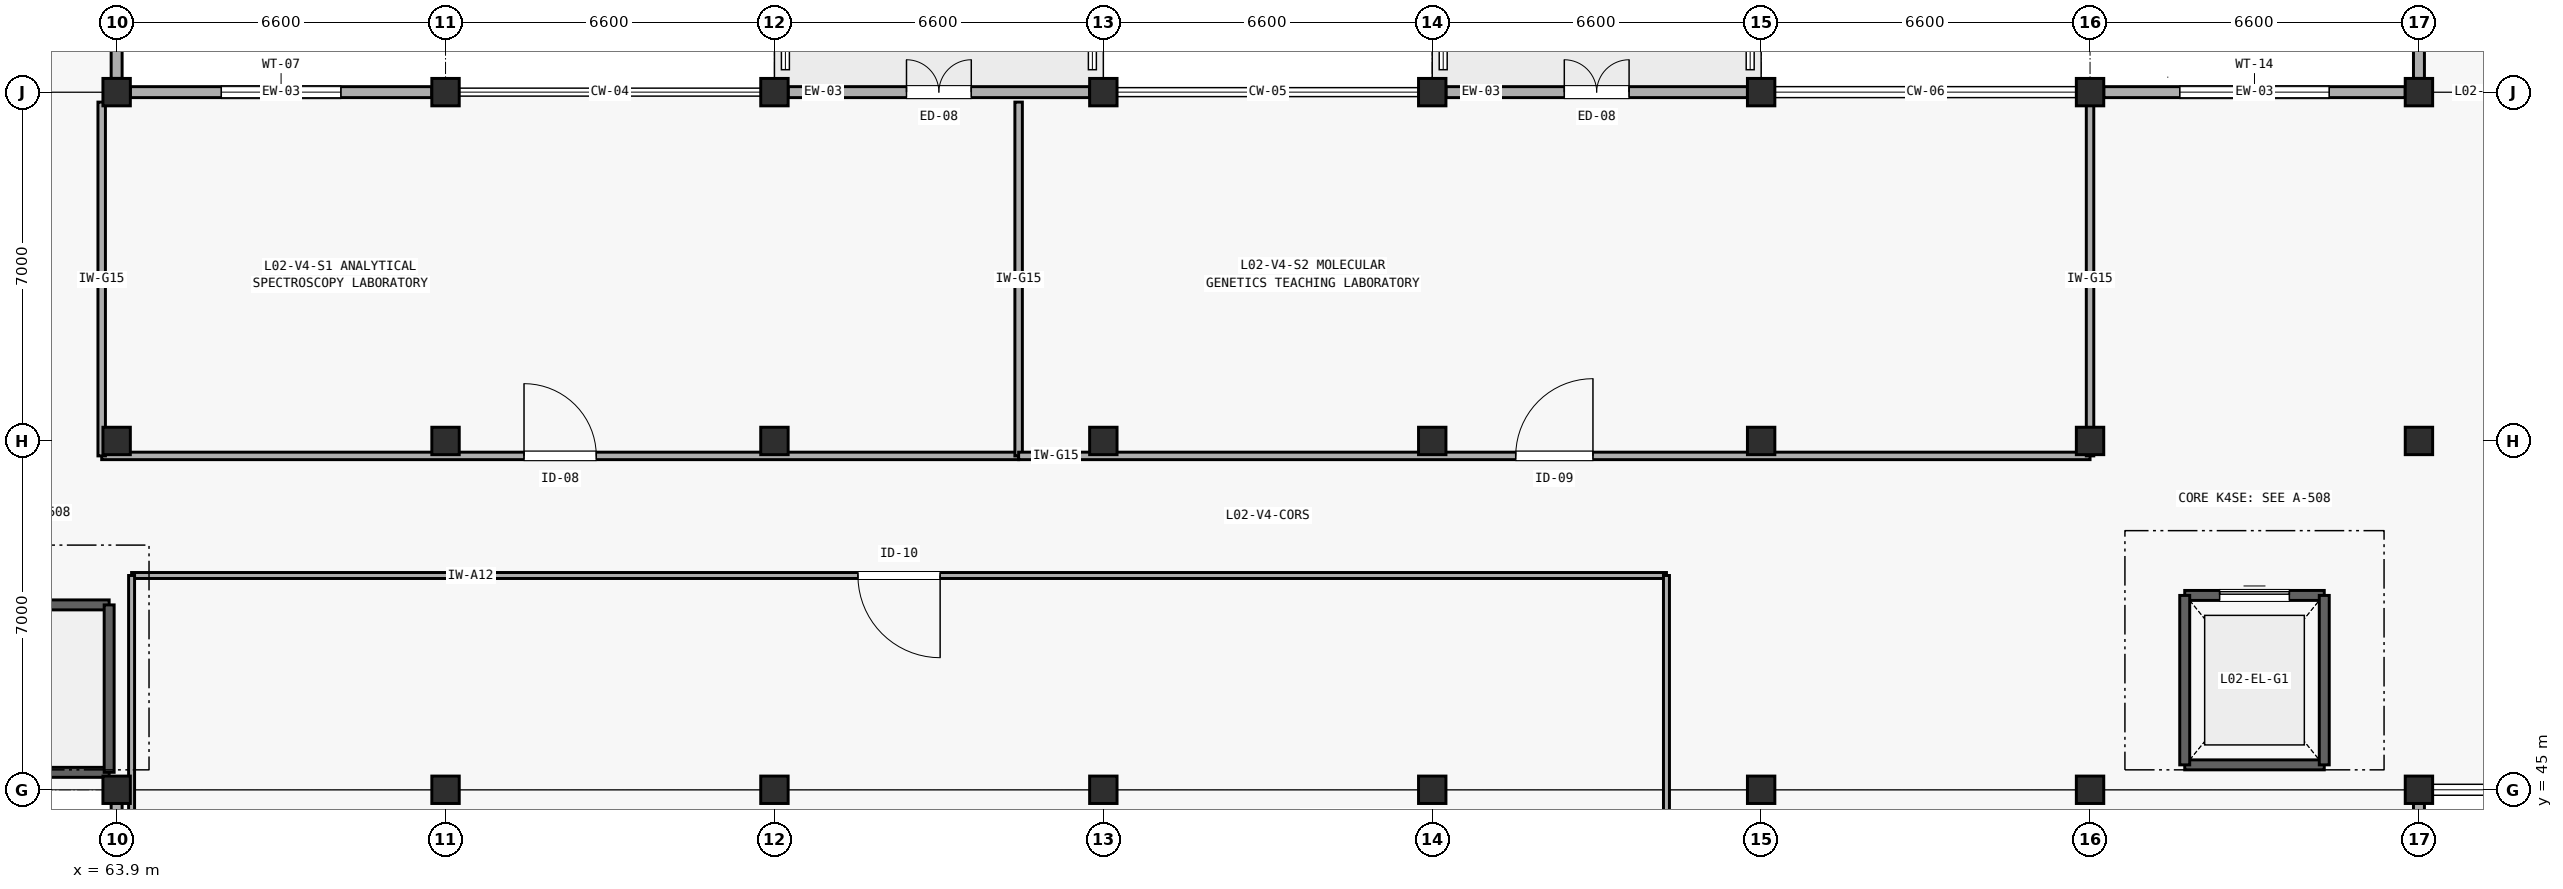
"""IFC4 building model, lengths in metres.
Left out: names, types, materials, properties, quantities, classifications, styles, units other than length and angle.
Written with IfcOpenShell. Run it as: python <this file> out.ifc"""

import sys

from ifc_helpers import new_model, si_unit, direction, frame, frame_2d, origin, origin_2d, place, context, subcontext, project, spatial, rectangle, extrude, element, fill, save


model = new_model("IFC4")
c1 = context("Model", 3, precision=1e-05, world=origin(), true_north=direction((0.0, 1.0)))
c2 = subcontext(c1, "Body", "Model", "MODEL_VIEW")
j1 = project(units=[si_unit("LENGTHUNIT", "METRE"), si_unit("PLANEANGLEUNIT", "RADIAN")], contexts=[c1])
p1 = place(None, origin())
s1 = spatial("IfcSite", under=j1, at=p1, CompositionType="ELEMENT")
p2 = place(p1, origin())
s2 = spatial("IfcBuilding", under=s1, at=p2, CompositionType="ELEMENT")
p3 = place(p2, frame((0.0, 0.0, 8.4)))
s3 = spatial("IfcBuildingStorey", under=s2, at=p3, CompositionType="ELEMENT", Elevation=8.4)
for number, where, z_axis, x_axis in (
    (1, (63.9, 45.0, 0.0), (0.0, 0.0, 1.0), (1.0, 0.0, 0.0)),
    (2, (63.9, 52.0, 0.0), (0.0, 0.0, 1.0), (1.0, 0.0, 0.0)),
    (3, (63.9, 59.0, 0.0), (0.0, 0.0, 1.0), (1.0, 0.0, 0.0)),
    (4, (70.5, 45.0, 0.0), (0.0, 0.0, 1.0), (1.0, 0.0, 0.0)),
    (5, (70.5, 52.0, 0.0), (0.0, 0.0, 1.0), (1.0, 0.0, 0.0)),
    (6, (70.5, 59.0, 0.0), (0.0, 0.0, 1.0), (1.0, 0.0, 0.0)),
    (7, (77.1, 45.0, 0.0), (0.0, 0.0, 1.0), (1.0, 0.0, 0.0)),
    (8, (77.1, 52.0, 0.0), (0.0, 0.0, 1.0), (1.0, 0.0, 0.0)),
    (9, (77.1, 59.0, 0.0), (0.0, 0.0, 1.0), (1.0, 0.0, 0.0)),
    (10, (83.7, 45.0, 0.0), (0.0, 0.0, 1.0), (1.0, 0.0, 0.0)),
    (11, (83.7, 52.0, 0.0), (0.0, 0.0, 1.0), (1.0, 0.0, 0.0)),
    (12, (83.7, 59.0, 0.0), (0.0, 0.0, 1.0), (1.0, 0.0, 0.0)),
    (13, (90.3, 45.0, 0.0), (0.0, 0.0, 1.0), (1.0, 0.0, 0.0)),
    (14, (90.3, 52.0, 0.0), (0.0, 0.0, 1.0), (1.0, 0.0, 0.0)),
    (15, (90.3, 59.0, 0.0), (0.0, 0.0, 1.0), (1.0, 0.0, 0.0)),
    (16, (96.9, 45.0, 0.0), (0.0, 0.0, 1.0), (1.0, 0.0, 0.0)),
    (17, (96.9, 52.0, 0.0), (0.0, 0.0, 1.0), (1.0, 0.0, 0.0)),
    (18, (96.9, 59.0, 0.0), (0.0, 0.0, 1.0), (1.0, 0.0, 0.0)),
    (19, (103.5, 45.0, 0.0), (0.0, 0.0, 1.0), (1.0, 0.0, 0.0)),
    (20, (103.5, 52.0, 0.0), (0.0, 0.0, 1.0), (1.0, 0.0, 0.0)),
    (21, (103.5, 59.0, 0.0), (0.0, 0.0, 1.0), (1.0, 0.0, 0.0)),
    (22, (110.1, 45.0, 0.0), (0.0, 0.0, 1.0), (1.0, 0.0, 0.0)),
    (23, (110.1, 52.0, 0.0), (0.0, 0.0, 1.0), (1.0, 0.0, 0.0)),
    (24, (110.1, 59.0, 0.0), (0.0, 0.0, 1.0), (1.0, 0.0, 0.0)),
):
    element("IfcColumn", number, at=place(p3, frame(where, z_axis=z_axis, x_axis=x_axis)), inside=s3, PredefinedType="COLUMN", context=c2, shape_type="SweptSolid", body=[
        extrude(rectangle(XDim=0.55, YDim=0.55, at=origin_2d()), origin(), (0.0, 0.0, 1.0), 4.2),
    ])
p4 = place(p3, frame((64.175, 59.0, 0.0), z_axis=(0.0, 0.0, 1.0), x_axis=(1.0, 0.0, 0.0)))
e25 = element("IfcWall", 25, at=p4, inside=s3, PredefinedType="SOLIDWALL", context=c2, shape_type="SweptSolid", body=[
    extrude(rectangle(XDim=6.05, YDim=0.22, at=frame_2d((3.025, 0.0))), origin(), (0.0, 0.0, 1.0), 3.235),
])
p5 = place(p4, frame((1.825, 0.0, 0.85)))
e26 = element("IfcOpeningElement", 26, at=p5, cuts=e25, PredefinedType="OPENING", context=c2, shape_type="SweptSolid", body=[
    extrude(rectangle(XDim=2.4, YDim=1.35, at=frame_2d((1.2, 0.675))), frame((0.0, 0.12, 0.0), z_axis=(0.0, -1.0, 0.0), x_axis=(1.0, 0.0, 0.0)), (0.0, 0.0, 1.0), 0.24),
])
p6 = place(p3, frame((77.375, 59.0, 0.0), z_axis=(0.0, 0.0, 1.0), x_axis=(1.0, 0.0, 0.0)))
e27 = element("IfcWall", 27, at=p6, inside=s3, PredefinedType="SOLIDWALL", context=c2, shape_type="SweptSolid", body=[
    extrude(rectangle(XDim=6.05, YDim=0.22, at=frame_2d((3.025, 0.0))), origin(), (0.0, 0.0, 1.0), 3.285),
])
p7 = place(p6, frame((2.375, 0.0, 0.0)))
e28 = element("IfcOpeningElement", 28, at=p7, cuts=e27, PredefinedType="OPENING", context=c2, shape_type="SweptSolid", body=[
    extrude(rectangle(XDim=1.3, YDim=2.15, at=frame_2d((0.65, 1.075))), frame((0.0, 0.12, 0.0), z_axis=(0.0, -1.0, 0.0), x_axis=(1.0, 0.0, 0.0)), (0.0, 0.0, 1.0), 0.24),
])
p8 = place(p3, frame((90.575, 59.0, 0.0), z_axis=(0.0, 0.0, 1.0), x_axis=(1.0, 0.0, 0.0)))
e29 = element("IfcWall", 29, at=p8, inside=s3, PredefinedType="SOLIDWALL", context=c2, shape_type="SweptSolid", body=[
    extrude(rectangle(XDim=6.05, YDim=0.22, at=frame_2d((3.025, 0.0))), origin(), (0.0, 0.0, 1.0), 3.365),
])
p9 = place(p8, frame((2.375, 0.0, 0.0)))
e30 = element("IfcOpeningElement", 30, at=p9, cuts=e29, PredefinedType="OPENING", context=c2, shape_type="SweptSolid", body=[
    extrude(rectangle(XDim=1.3, YDim=2.15, at=frame_2d((0.65, 1.075))), frame((0.0, 0.12, 0.0), z_axis=(0.0, -1.0, 0.0), x_axis=(1.0, 0.0, 0.0)), (0.0, 0.0, 1.0), 0.24),
])
p10 = place(p3, frame((103.775, 59.0, 0.0), z_axis=(0.0, 0.0, 1.0), x_axis=(1.0, 0.0, 0.0)))
e31 = element("IfcWall", 31, at=p10, inside=s3, PredefinedType="SOLIDWALL", context=c2, shape_type="SweptSolid", body=[
    extrude(rectangle(XDim=6.05, YDim=0.22, at=frame_2d((3.025, 0.0))), origin(), (0.0, 0.0, 1.0), 3.345),
])
p11 = place(p10, frame((1.525, 0.0, 0.85)))
e32 = element("IfcOpeningElement", 32, at=p11, cuts=e31, PredefinedType="OPENING", context=c2, shape_type="SweptSolid", body=[
    extrude(rectangle(XDim=3.0, YDim=1.5, at=frame_2d((1.5, 0.75))), frame((0.0, 0.12, 0.0), z_axis=(0.0, -1.0, 0.0), x_axis=(1.0, 0.0, 0.0)), (0.0, 0.0, 1.0), 0.24),
])
p12 = place(p3, frame((63.9, 38.3, 0.0), z_axis=(0.0, 0.0, 1.0), x_axis=(0.0, 1.0, 0.0)))
e33 = element("IfcWall", 33, at=p12, inside=s3, PredefinedType="SOLIDWALL", context=c2, shape_type="SweptSolid", body=[
    extrude(rectangle(XDim=6.425, YDim=0.22, at=frame_2d((3.212, 0.0))), origin(), (0.0, 0.0, 1.0), 3.505),
])
p13 = place(p12, frame((1.913, 0.0, 0.85)))
e34 = element("IfcOpeningElement", 34, at=p13, cuts=e33, PredefinedType="OPENING", context=c2, shape_type="SweptSolid", body=[
    extrude(rectangle(XDim=2.6, YDim=1.2, at=frame_2d((1.3, 0.6))), frame((0.0, 0.12, 0.0), z_axis=(0.0, -1.0, 0.0), x_axis=(1.0, 0.0, 0.0)), (0.0, 0.0, 1.0), 0.24),
])
p14 = place(p3, frame((63.9, 59.275, 0.0), z_axis=(0.0, 0.0, 1.0), x_axis=(0.0, 1.0, 0.0)))
e35 = element("IfcWall", 35, at=p14, inside=s3, PredefinedType="SOLIDWALL", context=c2, shape_type="SweptSolid", body=[
    extrude(rectangle(XDim=6.45, YDim=0.22, at=frame_2d((3.225, 0.0))), origin(), (0.0, 0.0, 1.0), 3.505),
])
p15 = place(p14, frame((1.525, 0.0, 0.85)))
e36 = element("IfcOpeningElement", 36, at=p15, cuts=e35, PredefinedType="OPENING", context=c2, shape_type="SweptSolid", body=[
    extrude(rectangle(XDim=3.4, YDim=1.2, at=frame_2d((1.7, 0.6))), frame((0.0, 0.12, 0.0), z_axis=(0.0, -1.0, 0.0), x_axis=(1.0, 0.0, 0.0)), (0.0, 0.0, 1.0), 0.24),
])
p16 = place(p3, frame((110.1, 38.3, 0.0), z_axis=(0.0, 0.0, 1.0), x_axis=(0.0, 1.0, 0.0)))
e37 = element("IfcWall", 37, at=p16, inside=s3, PredefinedType="SOLIDWALL", context=c2, shape_type="SweptSolid", body=[
    extrude(rectangle(XDim=6.425, YDim=0.22, at=frame_2d((3.212, 0.0))), origin(), (0.0, 0.0, 1.0), 3.465),
])
p17 = place(p16, frame((2.188, 0.0, 0.85)))
e38 = element("IfcOpeningElement", 38, at=p17, cuts=e37, PredefinedType="OPENING", context=c2, shape_type="SweptSolid", body=[
    extrude(rectangle(XDim=2.05, YDim=1.55, at=frame_2d((1.025, 0.775))), frame((0.0, 0.12, 0.0), z_axis=(0.0, -1.0, 0.0), x_axis=(1.0, 0.0, 0.0)), (0.0, 0.0, 1.0), 0.24),
])
p18 = place(p3, frame((110.1, 59.275, 0.0), z_axis=(0.0, 0.0, 1.0), x_axis=(0.0, 1.0, 0.0)))
e39 = element("IfcWall", 39, at=p18, inside=s3, PredefinedType="SOLIDWALL", context=c2, shape_type="SweptSolid", body=[
    extrude(rectangle(XDim=6.45, YDim=0.22, at=frame_2d((3.225, 0.0))), origin(), (0.0, 0.0, 1.0), 3.465),
])
p19 = place(p18, frame((2.55, 0.0, 0.85)))
e40 = element("IfcOpeningElement", 40, at=p19, cuts=e39, PredefinedType="OPENING", context=c2, shape_type="SweptSolid", body=[
    extrude(rectangle(XDim=1.35, YDim=1.35, at=frame_2d((0.675, 0.675))), frame((0.0, 0.12, 0.0), z_axis=(0.0, -1.0, 0.0), x_axis=(1.0, 0.0, 0.0)), (0.0, 0.0, 1.0), 0.24),
])
p20 = place(p3, frame((57.45, 45.35, 0.0), z_axis=(0.0, 0.0, 1.0), x_axis=(1.0, 0.0, 0.0)))
e41 = element("IfcWall", 41, at=p20, inside=s3, PredefinedType="SHEAR", context=c2, shape_type="SweptSolid", body=[
    extrude(rectangle(XDim=6.3, YDim=0.2, at=frame_2d((3.15, 0.0))), origin(), (0.0, 0.0, 1.0), 4.2),
])
p21 = place(p3, frame((57.45, 48.71, 0.0), z_axis=(0.0, 0.0, 1.0), x_axis=(1.0, 0.0, 0.0)))
e42 = element("IfcWall", 42, at=p21, inside=s3, PredefinedType="SHEAR", context=c2, shape_type="SweptSolid", body=[
    extrude(rectangle(XDim=6.3, YDim=0.2, at=frame_2d((3.15, 0.0))), origin(), (0.0, 0.0, 1.0), 4.2),
])
p22 = place(p21, frame((0.32, 0.0, 0.0)))
e43 = element("IfcOpeningElement", 43, at=p22, cuts=e42, PredefinedType="OPENING", context=c2, shape_type="SweptSolid", body=[
    extrude(rectangle(XDim=1.2, YDim=2.15, at=frame_2d((0.6, 1.075))), frame((0.0, 0.11, 0.0), z_axis=(0.0, -1.0, 0.0), x_axis=(1.0, 0.0, 0.0)), (0.0, 0.0, 1.0), 0.22),
])
p23 = place(p3, frame((63.75, 45.35, 0.0), z_axis=(0.0, 0.0, 1.0), x_axis=(0.0, 1.0, 0.0)))
e44 = element("IfcWall", 44, at=p23, inside=s3, PredefinedType="SHEAR", context=c2, shape_type="SweptSolid", body=[
    extrude(rectangle(XDim=3.36, YDim=0.2, at=frame_2d((1.68, 0.0))), origin(), (0.0, 0.0, 1.0), 4.2),
])
p24 = place(p3, frame((105.4, 45.5, 0.0), z_axis=(0.0, 0.0, 1.0), x_axis=(1.0, 0.0, 0.0)))
e45 = element("IfcWall", 45, at=p24, inside=s3, PredefinedType="SHEAR", context=c2, shape_type="SweptSolid", body=[
    extrude(rectangle(XDim=2.8, YDim=0.2, at=frame_2d((1.4, 0.0))), origin(), (0.0, 0.0, 1.0), 4.2),
])
p25 = place(p3, frame((105.4, 48.9, 0.0), z_axis=(0.0, 0.0, 1.0), x_axis=(1.0, 0.0, 0.0)))
e46 = element("IfcWall", 46, at=p25, inside=s3, PredefinedType="SHEAR", context=c2, shape_type="SweptSolid", body=[
    extrude(rectangle(XDim=2.8, YDim=0.2, at=frame_2d((1.4, 0.0))), origin(), (0.0, 0.0, 1.0), 4.2),
])
p26 = place(p25, frame((0.7, 0.0, 0.0)))
e47 = element("IfcOpeningElement", 47, at=p26, cuts=e46, PredefinedType="OPENING", context=c2, shape_type="SweptSolid", body=[
    extrude(rectangle(XDim=1.4, YDim=2.3, at=frame_2d((0.7, 1.15))), frame((0.0, 0.11, 0.0), z_axis=(0.0, -1.0, 0.0), x_axis=(1.0, 0.0, 0.0)), (0.0, 0.0, 1.0), 0.22),
])
for number, where, z_axis, x_axis in (
    (48, (105.4, 45.5, 0.0), (0.0, 0.0, 1.0), (0.0, 1.0, 0.0)),
    (49, (108.2, 45.5, 0.0), (0.0, 0.0, 1.0), (0.0, 1.0, 0.0)),
):
    element("IfcWall", number, at=place(p3, frame(where, z_axis=z_axis, x_axis=x_axis)), inside=s3, PredefinedType="SHEAR", context=c2, shape_type="SweptSolid", body=[
        extrude(rectangle(XDim=3.4, YDim=0.2, at=frame_2d((1.7, 0.0))), origin(), (0.0, 0.0, 1.0), 4.2),
    ])
p27 = place(p3, frame((63.6, 51.7, 0.0), z_axis=(0.0, 0.0, 1.0), x_axis=(1.0, 0.0, 0.0)))
e50 = element("IfcWall", 50, at=p27, inside=s3, PredefinedType="PARTITIONING", context=c2, shape_type="SweptSolid", body=[
    extrude(rectangle(XDim=18.4, YDim=0.15, at=frame_2d((9.2, 0.0))), origin(), (0.0, 0.0, 1.0), 3.235),
])
p28 = place(p27, frame((8.475, 0.0, 0.0)))
e51 = element("IfcOpeningElement", 51, at=p28, cuts=e50, PredefinedType="OPENING", context=c2, shape_type="SweptSolid", body=[
    extrude(rectangle(XDim=1.45, YDim=2.2, at=frame_2d((0.725, 1.1))), frame((0.0, 0.085, 0.0), z_axis=(0.0, -1.0, 0.0), x_axis=(1.0, 0.0, 0.0)), (0.0, 0.0, 1.0), 0.17),
])
p29 = place(p3, frame((63.6, 51.7, 0.0), z_axis=(0.0, 0.0, 1.0), x_axis=(0.0, 1.0, 0.0)))
e52 = element("IfcWall", 52, at=p29, inside=s3, PredefinedType="PARTITIONING", context=c2, shape_type="SweptSolid", body=[
    extrude(rectangle(XDim=7.1, YDim=0.15, at=frame_2d((3.55, 0.0))), origin(), (0.0, 0.0, 1.0), 3.445),
])
p30 = place(p3, frame((82.0, 51.7, 0.0), z_axis=(0.0, 0.0, 1.0), x_axis=(0.0, 1.0, 0.0)))
e53 = element("IfcWall", 53, at=p30, inside=s3, PredefinedType="PARTITIONING", context=c2, shape_type="SweptSolid", body=[
    extrude(rectangle(XDim=7.1, YDim=0.15, at=frame_2d((3.55, 0.0))), origin(), (0.0, 0.0, 1.0), 3.501),
])
p31 = place(p3, frame((82.0, 51.7, 0.0), z_axis=(0.0, 0.0, 1.0), x_axis=(1.0, 0.0, 0.0)))
e54 = element("IfcWall", 54, at=p31, inside=s3, PredefinedType="PARTITIONING", context=c2, shape_type="SweptSolid", body=[
    extrude(rectangle(XDim=21.5, YDim=0.15, at=frame_2d((10.75, 0.0))), origin(), (0.0, 0.0, 1.0), 3.285),
])
p32 = place(p31, frame((9.975, 0.0, 0.0)))
e55 = element("IfcOpeningElement", 55, at=p32, cuts=e54, PredefinedType="OPENING", context=c2, shape_type="SweptSolid", body=[
    extrude(rectangle(XDim=1.55, YDim=2.2, at=frame_2d((0.775, 1.1))), frame((0.0, 0.085, 0.0), z_axis=(0.0, -1.0, 0.0), x_axis=(1.0, 0.0, 0.0)), (0.0, 0.0, 1.0), 0.17),
])
p33 = place(p3, frame((103.5, 51.7, 0.0), z_axis=(0.0, 0.0, 1.0), x_axis=(0.0, 1.0, 0.0)))
e56 = element("IfcWall", 56, at=p33, inside=s3, PredefinedType="PARTITIONING", context=c2, shape_type="SweptSolid", body=[
    extrude(rectangle(XDim=7.1, YDim=0.15, at=frame_2d((3.55, 0.0))), origin(), (0.0, 0.0, 1.0), 3.445),
])
p34 = place(p3, frame((64.2, 49.3, 0.0), z_axis=(0.0, 0.0, 1.0), x_axis=(1.0, 0.0, 0.0)))
e57 = element("IfcWall", 57, at=p34, inside=s3, PredefinedType="PARTITIONING", context=c2, shape_type="SweptSolid", body=[
    extrude(rectangle(XDim=30.8, YDim=0.12, at=frame_2d((15.4, 0.0))), origin(), (0.0, 0.0, 1.0), 3.9),
])
p35 = place(p34, frame((14.575, 0.0, 0.0)))
e58 = element("IfcOpeningElement", 58, at=p35, cuts=e57, PredefinedType="OPENING", context=c2, shape_type="SweptSolid", body=[
    extrude(rectangle(XDim=1.65, YDim=2.25, at=frame_2d((0.825, 1.125))), frame((0.0, 0.07, 0.0), z_axis=(0.0, -1.0, 0.0), x_axis=(1.0, 0.0, 0.0)), (0.0, 0.0, 1.0), 0.14),
])
for number, where, z_axis, x_axis in (
    (59, (64.2, 38.2, 0.0), (0.0, 0.0, 1.0), (0.0, 1.0, 0.0)),
    (60, (95.0, 38.2, 0.0), (0.0, 0.0, 1.0), (0.0, 1.0, 0.0)),
):
    element("IfcWall", number, at=place(p3, frame(where, z_axis=z_axis, x_axis=x_axis)), inside=s3, PredefinedType="PARTITIONING", context=c2, shape_type="SweptSolid", body=[
        extrude(rectangle(XDim=11.1, YDim=0.12, at=frame_2d((5.55, 0.0))), origin(), (0.0, 0.0, 1.0), 3.9),
    ])
p36 = place(p5, origin())
e61 = element("IfcWindow", 61, at=p36, inside=s3, PartitioningType="SINGLE_PANEL", PredefinedType="WINDOW", context=c2, shape_type="SweptSolid", body=[
    extrude(rectangle(XDim=2.4, YDim=1.35, at=frame_2d((1.2, 0.675))), frame((0.0, 0.03, 0.0), z_axis=(0.0, -1.0, 0.0), x_axis=(1.0, 0.0, 0.0)), (0.0, 0.0, 1.0), 0.06),
])
fill(e26, e61)
p37 = place(p7, origin())
e62 = element("IfcDoor", 62, at=p37, inside=s3, OperationType="DOUBLE_DOOR_SINGLE_SWING", PredefinedType="DOOR", context=c2, shape_type="SweptSolid", body=[
    extrude(rectangle(XDim=1.3, YDim=2.15, at=frame_2d((0.65, 1.075))), frame((0.0, 0.025, 0.0), z_axis=(0.0, -1.0, 0.0), x_axis=(1.0, 0.0, 0.0)), (0.0, 0.0, 1.0), 0.05),
])
fill(e28, e62)
p38 = place(p9, origin())
e63 = element("IfcDoor", 63, at=p38, inside=s3, OperationType="DOUBLE_DOOR_SINGLE_SWING", PredefinedType="DOOR", context=c2, shape_type="SweptSolid", body=[
    extrude(rectangle(XDim=1.3, YDim=2.15, at=frame_2d((0.65, 1.075))), frame((0.0, 0.025, 0.0), z_axis=(0.0, -1.0, 0.0), x_axis=(1.0, 0.0, 0.0)), (0.0, 0.0, 1.0), 0.05),
])
fill(e30, e63)
p39 = place(p11, origin())
e64 = element("IfcWindow", 64, at=p39, inside=s3, PartitioningType="SINGLE_PANEL", PredefinedType="WINDOW", context=c2, shape_type="SweptSolid", body=[
    extrude(rectangle(XDim=3.0, YDim=1.5, at=frame_2d((1.5, 0.75))), frame((0.0, 0.03, 0.0), z_axis=(0.0, -1.0, 0.0), x_axis=(1.0, 0.0, 0.0)), (0.0, 0.0, 1.0), 0.06),
])
fill(e32, e64)
p40 = place(p26, origin())
e65 = element("IfcDoor", 65, at=p40, inside=s3, OperationType="SLIDING_TO_LEFT", PredefinedType="DOOR", context=c2, shape_type="SweptSolid", body=[
    extrude(rectangle(XDim=1.4, YDim=2.3, at=frame_2d((0.7, 1.15))), frame((0.0, 0.025, 0.0), z_axis=(0.0, -1.0, 0.0), x_axis=(1.0, 0.0, 0.0)), (0.0, 0.0, 1.0), 0.05),
])
fill(e47, e65)
p41 = place(p28, origin())
e66 = element("IfcDoor", 66, at=p41, inside=s3, OperationType="SINGLE_SWING_LEFT", PredefinedType="DOOR", context=c2, shape_type="SweptSolid", body=[
    extrude(rectangle(XDim=1.45, YDim=2.2, at=frame_2d((0.725, 1.1))), frame((0.0, 0.025, 0.0), z_axis=(0.0, -1.0, 0.0), x_axis=(1.0, 0.0, 0.0)), (0.0, 0.0, 1.0), 0.05),
])
fill(e51, e66)
p42 = place(p32, origin())
e67 = element("IfcDoor", 67, at=p42, inside=s3, OperationType="SINGLE_SWING_RIGHT", PredefinedType="DOOR", context=c2, shape_type="SweptSolid", body=[
    extrude(rectangle(XDim=1.55, YDim=2.2, at=frame_2d((0.775, 1.1))), frame((0.0, 0.025, 0.0), z_axis=(0.0, -1.0, 0.0), x_axis=(1.0, 0.0, 0.0)), (0.0, 0.0, 1.0), 0.05),
])
fill(e55, e67)
p43 = place(p35, frame((1.65, 0.0, 0.0), z_axis=(0.0, 0.0, 1.0), x_axis=(-1.0, 0.0, 0.0)))
e68 = element("IfcDoor", 68, at=p43, inside=s3, OperationType="SINGLE_SWING_LEFT", PredefinedType="DOOR", context=c2, shape_type="SweptSolid", body=[
    extrude(rectangle(XDim=1.65, YDim=2.25, at=frame_2d((0.825, 1.125))), frame((0.0, 0.025, 0.0), z_axis=(0.0, -1.0, 0.0), x_axis=(1.0, 0.0, 0.0)), (0.0, 0.0, 1.0), 0.05),
])
fill(e58, e68)
save(model, sys.argv[1])
